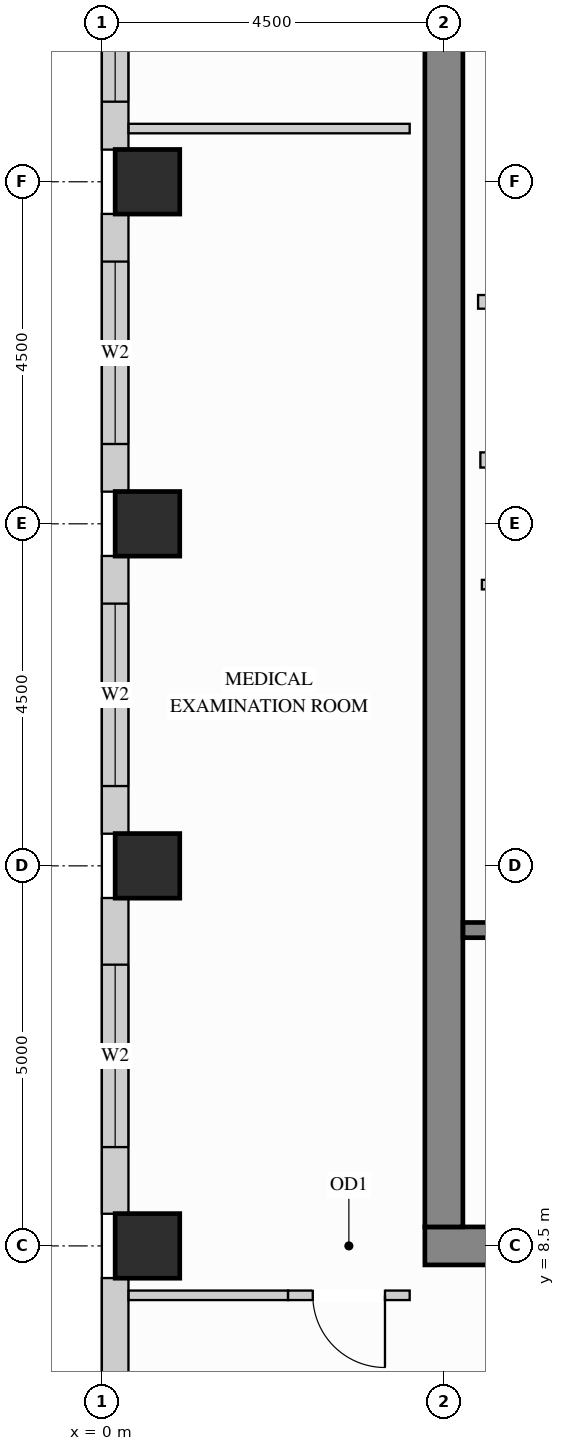
"""IFC4 building model, lengths in metres.
Left out: names, types, materials, properties, quantities, classifications, styles, units other than length and angle.
Written with IfcOpenShell. Run it as: python <this file> out.ifc"""

import sys

from ifc_helpers import new_model, si_unit, direction, frame, frame_2d, origin, origin_2d, place, context, subcontext, project, spatial, rectangle, extrude, source, transform, mapped, element, fill, save


model = new_model("IFC4")
c1 = context("Model", 3, precision=1e-05, world=origin(), true_north=direction((0.0, 1.0)))
c2 = subcontext(c1, "Body", "Model", "MODEL_VIEW")
j1 = project(units=[si_unit("LENGTHUNIT", "METRE"), si_unit("PLANEANGLEUNIT", "RADIAN")], contexts=[c1])
p1 = place(None, origin())
s1 = spatial("IfcSite", under=j1, at=p1, CompositionType="ELEMENT")
p2 = place(p1, origin())
s2 = spatial("IfcBuilding", under=s1, at=p2, CompositionType="ELEMENT")
p3 = place(p2, frame((0.0, 0.0, 226.8)))
s3 = spatial("IfcBuildingStorey", under=s2, at=p3, CompositionType="ELEMENT", Elevation=226.8)
m1 = source(origin(), c2, "Body", "SweptSolid", [
    extrude(rectangle(XDim=0.85, YDim=0.85, at=origin_2d()), origin(), (0.0, 0.0, 1.0), 3.4),
])
for number, where, z_axis, x_axis in (
    (1, (0.6, 13.5, 0.0), (0.0, 0.0, 1.0), (1.0, 0.0, 0.0)),
    (2, (0.6, 18.0, 0.0), (0.0, 0.0, 1.0), (1.0, 0.0, 0.0)),
    (3, (0.6, 22.5, 0.0), (0.0, 0.0, 1.0), (1.0, 0.0, 0.0)),
    (4, (0.6, 8.5, 0.0), (0.0, 0.0, 1.0), (1.0, 0.0, 0.0)),
):
    element("IfcColumn", number, at=place(p3, frame(where, z_axis=z_axis, x_axis=x_axis)), inside=s3, PredefinedType="COLUMN", context=c2, shape_type="MappedRepresentation", body=[
        mapped(m1, transform((0.0, 0.0, 0.0), x_axis=(1.0, 0.0, 0.0), y_axis=(0.0, 1.0, 0.0), z_axis=(0.0, 0.0, 1.0))),
    ])
m2 = source(origin(), c2, "Body", "SweptSolid", [
    extrude(rectangle(XDim=10.5, YDim=0.5, at=frame_2d((5.25, 0.0))), origin(), (0.0, 0.0, 1.0), 3.4),
])
p4 = place(p3, frame((4.25, 8.5, 0.0), z_axis=(0.0, 0.0, 1.0), x_axis=(1.0, 0.0, 0.0)))
e5 = element("IfcWall", 5, at=p4, inside=s3, PredefinedType="SHEAR", context=c2, shape_type="MappedRepresentation", body=[
    mapped(m2, transform((0.0, 0.0, 0.0), x_axis=(1.0, 0.0, 0.0), y_axis=(0.0, 1.0, 0.0), z_axis=(0.0, 0.0, 1.0))),
])
m3 = source(origin(), c2, "Body", "SweptSolid", [
    extrude(rectangle(XDim=20.5, YDim=0.5, at=frame_2d((10.25, 0.0))), origin(), (0.0, 0.0, 1.0), 3.4),
])
p5 = place(p3, frame((4.5, 8.75, 0.0), z_axis=(0.0, 0.0, 1.0), x_axis=(0.0, 1.0, 0.0)))
e6 = element("IfcWall", 6, at=p5, inside=s3, PredefinedType="SHEAR", context=c2, shape_type="MappedRepresentation", body=[
    mapped(m3, transform((0.0, 0.0, 0.0), x_axis=(1.0, 0.0, 0.0), y_axis=(0.0, 1.0, 0.0), z_axis=(0.0, 0.0, 1.0))),
])
p6 = place(p3, frame((0.175, 26.377, 0.0), z_axis=(0.0, 0.0, 1.0), x_axis=(0.0, -1.0, 0.0)))
e7 = element("IfcWall", 7, at=p6, inside=s3, PredefinedType="SOLIDWALL", context=c2, shape_type="SweptSolid", body=[
    extrude(rectangle(XDim=3.454, YDim=0.35, at=frame_2d((1.727, 0.0))), origin(), (0.0, 0.0, 1.0), 3.385),
])
p7 = place(p6, frame((0.424, 0.0, 0.78)))
e8 = element("IfcOpeningElement", 8, at=p7, cuts=e7, PredefinedType="OPENING", context=c2, shape_type="SweptSolid", body=[
    extrude(rectangle(XDim=2.4, YDim=2.1, at=frame_2d((1.2, 1.05))), frame((0.0, 0.185, 0.0), z_axis=(0.0, -1.0, 0.0), x_axis=(1.0, 0.0, 0.0)), (0.0, 0.0, 1.0), 0.37),
])
p8 = place(p3, frame((0.175, 22.077, 0.0), z_axis=(0.0, 0.0, 1.0), x_axis=(0.0, -1.0, 0.0)))
e9 = element("IfcWall", 9, at=p8, inside=s3, PredefinedType="SOLIDWALL", context=c2, shape_type="SweptSolid", body=[
    extrude(rectangle(XDim=3.654, YDim=0.35, at=frame_2d((1.827, 0.0))), origin(), (0.0, 0.0, 1.0), 3.385),
])
p9 = place(p8, frame((0.627, 0.0, 0.78)))
e10 = element("IfcOpeningElement", 10, at=p9, cuts=e9, PredefinedType="OPENING", context=c2, shape_type="SweptSolid", body=[
    extrude(rectangle(XDim=2.4, YDim=2.1, at=frame_2d((1.2, 1.05))), frame((0.0, 0.185, 0.0), z_axis=(0.0, -1.0, 0.0), x_axis=(1.0, 0.0, 0.0)), (0.0, 0.0, 1.0), 0.37),
])
p10 = place(p3, frame((0.175, 17.577, 0.0), z_axis=(0.0, 0.0, 1.0), x_axis=(0.0, -1.0, 0.0)))
e11 = element("IfcWall", 11, at=p10, inside=s3, PredefinedType="SOLIDWALL", context=c2, shape_type="SweptSolid", body=[
    extrude(rectangle(XDim=3.654, YDim=0.35, at=frame_2d((1.827, 0.0))), origin(), (0.0, 0.0, 1.0), 3.385),
])
p11 = place(p10, frame((0.627, 0.0, 0.78)))
e12 = element("IfcOpeningElement", 12, at=p11, cuts=e11, PredefinedType="OPENING", context=c2, shape_type="SweptSolid", body=[
    extrude(rectangle(XDim=2.4, YDim=2.1, at=frame_2d((1.2, 1.05))), frame((0.0, 0.185, 0.0), z_axis=(0.0, -1.0, 0.0), x_axis=(1.0, 0.0, 0.0)), (0.0, 0.0, 1.0), 0.37),
])
p12 = place(p3, frame((0.175, 13.077, 0.0), z_axis=(0.0, 0.0, 1.0), x_axis=(0.0, -1.0, 0.0)))
e13 = element("IfcWall", 13, at=p12, inside=s3, PredefinedType="SOLIDWALL", context=c2, shape_type="SweptSolid", body=[
    extrude(rectangle(XDim=4.154, YDim=0.35, at=frame_2d((2.077, 0.0))), origin(), (0.0, 0.0, 1.0), 3.385),
])
p13 = place(p12, frame((0.877, 0.0, 0.78)))
e14 = element("IfcOpeningElement", 14, at=p13, cuts=e13, PredefinedType="OPENING", context=c2, shape_type="SweptSolid", body=[
    extrude(rectangle(XDim=2.4, YDim=2.1, at=frame_2d((1.2, 1.05))), frame((0.0, 0.185, 0.0), z_axis=(0.0, -1.0, 0.0), x_axis=(1.0, 0.0, 0.0)), (0.0, 0.0, 1.0), 0.37),
])
p14 = place(p3, frame((0.175, 8.077, 0.0), z_axis=(0.0, 0.0, 1.0), x_axis=(0.0, -1.0, 0.0)))
e15 = element("IfcWall", 15, at=p14, inside=s3, PredefinedType="SOLIDWALL", context=c2, shape_type="SweptSolid", body=[
    extrude(rectangle(XDim=4.154, YDim=0.35, at=frame_2d((2.077, 0.0))), origin(), (0.0, 0.0, 1.0), 3.385),
])
p15 = place(p14, frame((2.355, 0.0, 0.78)))
e16 = element("IfcOpeningElement", 16, at=p15, cuts=e15, PredefinedType="OPENING", context=c2, shape_type="SweptSolid", body=[
    extrude(rectangle(XDim=1.2, YDim=2.1, at=frame_2d((0.6, 1.05))), frame((0.0, 0.185, 0.0), z_axis=(0.0, -1.0, 0.0), x_axis=(1.0, 0.0, 0.0)), (0.0, 0.0, 1.0), 0.37),
])
m4 = source(origin(), c2, "Body", "SweptSolid", [
    extrude(rectangle(XDim=2.2, YDim=0.18, at=frame_2d((1.1, 0.0))), origin(), (0.0, 0.0, 1.0), 3.385),
])
p16 = place(p3, frame((4.95, 20.92, 0.0), z_axis=(0.0, 0.0, 1.0), x_axis=(1.0, 0.0, 0.0)))
e17 = element("IfcWall", 17, at=p16, inside=s3, PredefinedType="PARTITIONING", context=c2, shape_type="MappedRepresentation", body=[
    mapped(m4, transform((0.0, 0.0, 0.0), x_axis=(1.0, 0.0, 0.0), y_axis=(0.0, 1.0, 0.0), z_axis=(0.0, 0.0, 1.0))),
])
p17 = place(p3, frame((5.0, 17.2, 0.0), z_axis=(0.0, 0.0, 1.0), x_axis=(1.0, 0.0, 0.0)))
e18 = element("IfcWall", 18, at=p17, inside=s3, PredefinedType="PARTITIONING", context=c2, shape_type="SweptSolid", body=[
    extrude(rectangle(XDim=2.4, YDim=0.125, at=frame_2d((1.2, 0.0))), origin(), (0.0, 0.0, 1.0), 3.385),
])
p18 = place(p17, frame((0.7, 0.0, 0.0)))
e19 = element("IfcOpeningElement", 19, at=p18, cuts=e18, PredefinedType="OPENING", context=c2, shape_type="SweptSolid", body=[
    extrude(rectangle(XDim=0.85, YDim=2.1, at=frame_2d((0.425, 1.05))), frame((0.0, 0.073, 0.0), z_axis=(0.0, -1.0, 0.0), x_axis=(1.0, 0.0, 0.0)), (0.0, 0.0, 1.0), 0.145),
])
m5 = source(origin(), c2, "Body", "SweptSolid", [
    extrude(rectangle(XDim=2.098, YDim=0.125, at=frame_2d((1.049, 0.0))), origin(), (0.0, 0.0, 1.0), 3.385),
])
p19 = place(p3, frame((0.352, 7.85, 0.0), z_axis=(0.0, 0.0, 1.0), x_axis=(1.0, 0.0, 0.0)))
e20 = element("IfcWall", 20, at=p19, inside=s3, PredefinedType="PARTITIONING", context=c2, shape_type="MappedRepresentation", body=[
    mapped(m5, transform((0.0, 0.0, 0.0), x_axis=(1.0, 0.0, 0.0), y_axis=(0.0, 1.0, 0.0), z_axis=(0.0, 0.0, 1.0))),
])
p20 = place(p3, frame((2.45, 7.85, 0.0), z_axis=(0.0, 0.0, 1.0), x_axis=(1.0, 0.0, 0.0)))
e21 = element("IfcWall", 21, at=p20, inside=s3, PredefinedType="PARTITIONING", context=c2, shape_type="SweptSolid", body=[
    extrude(rectangle(XDim=1.6, YDim=0.125, at=frame_2d((0.8, 0.0))), origin(), (0.0, 0.0, 1.0), 3.385),
])
p21 = place(p20, frame((0.325, 0.0, 0.0)))
e22 = element("IfcOpeningElement", 22, at=p21, cuts=e21, PredefinedType="OPENING", context=c2, shape_type="SweptSolid", body=[
    extrude(rectangle(XDim=0.95, YDim=2.15, at=frame_2d((0.475, 1.075))), frame((0.0, 0.073, 0.0), z_axis=(0.0, -1.0, 0.0), x_axis=(1.0, 0.0, 0.0)), (0.0, 0.0, 1.0), 0.145),
])
m6 = source(origin(), c2, "Body", "SweptSolid", [
    extrude(rectangle(XDim=3.698, YDim=0.125, at=frame_2d((1.849, 0.0))), origin(), (0.0, 0.0, 1.0), 3.385),
])
p22 = place(p3, frame((0.352, 23.2, 0.0), z_axis=(0.0, 0.0, 1.0), x_axis=(1.0, 0.0, 0.0)))
e23 = element("IfcWall", 23, at=p22, inside=s3, PredefinedType="PARTITIONING", context=c2, shape_type="MappedRepresentation", body=[
    mapped(m6, transform((0.0, 0.0, 0.0), x_axis=(1.0, 0.0, 0.0), y_axis=(0.0, 1.0, 0.0), z_axis=(0.0, 0.0, 1.0))),
])
m7 = source(origin(), c2, "Body", "SweptSolid", [
    extrude(rectangle(XDim=2.09, YDim=0.2, at=frame_2d((1.045, 0.0))), origin(), (0.0, 0.0, 1.0), 3.385),
])
p23 = place(p3, frame((4.98, 18.84, 0.0), z_axis=(0.0, 0.0, 1.0), x_axis=(1.0, 0.0, 0.0)))
e24 = element("IfcWall", 24, at=p23, inside=s3, PredefinedType="PARTITIONING", context=c2, shape_type="MappedRepresentation", body=[
    mapped(m7, transform((0.0, 0.0, 0.0), x_axis=(1.0, 0.0, 0.0), y_axis=(0.0, 1.0, 0.0), z_axis=(0.0, 0.0, 1.0))),
])
p24 = place(p3, frame((4.752, 12.655, 0.0), z_axis=(0.0, 0.0, 1.0), x_axis=(1.0, 0.0, 0.0)))
e25 = element("IfcWall", 25, at=p24, inside=s3, PredefinedType="SHEAR", context=c2, shape_type="SweptSolid", body=[
    extrude(rectangle(XDim=7.653, YDim=0.2, at=frame_2d((3.827, 0.0))), origin(), (0.0, 0.0, 1.0), 3.4),
])
p25 = place(p24, frame((0.4, 0.0, 0.0)))
e26 = element("IfcOpeningElement", 26, at=p25, cuts=e25, PredefinedType="OPENING", context=c2, shape_type="SweptSolid", body=[
    extrude(rectangle(XDim=1.1, YDim=2.15, at=frame_2d((0.55, 1.075))), frame((0.0, 0.11, 0.0), z_axis=(0.0, -1.0, 0.0), x_axis=(1.0, 0.0, 0.0)), (0.0, 0.0, 1.0), 0.22),
])
m8 = source(origin(), c2, "Body", "SweptSolid", [
    extrude(rectangle(XDim=0.95, YDim=2.15, at=frame_2d((0.475, 1.075))), frame((0.0, 0.025, 0.0), z_axis=(0.0, -1.0, 0.0), x_axis=(1.0, 0.0, 0.0)), (0.0, 0.0, 1.0), 0.05),
])
p26 = place(p21, origin())
e27 = element("IfcDoor", 27, at=p26, inside=s3, OperationType="SINGLE_SWING_RIGHT", PredefinedType="DOOR", context=c2, shape_type="MappedRepresentation", body=[
    mapped(m8, transform((0.0, 0.0, 0.0), x_axis=(1.0, 0.0, 0.0), y_axis=(0.0, 1.0, 0.0), z_axis=(0.0, 0.0, 1.0))),
])
fill(e22, e27)
m9 = source(origin(), c2, "Body", "SweptSolid", [
    extrude(rectangle(XDim=2.4, YDim=2.1, at=frame_2d((1.2, 1.05))), frame((0.0, 0.03, 0.0), z_axis=(0.0, -1.0, 0.0), x_axis=(1.0, 0.0, 0.0)), (0.0, 0.0, 1.0), 0.06),
])
p27 = place(p7, origin())
e28 = element("IfcWindow", 28, at=p27, inside=s3, PartitioningType="SINGLE_PANEL", PredefinedType="WINDOW", context=c2, shape_type="MappedRepresentation", body=[
    mapped(m9, transform((0.0, 0.0, 0.0), x_axis=(1.0, 0.0, 0.0), y_axis=(0.0, 1.0, 0.0), z_axis=(0.0, 0.0, 1.0))),
])
fill(e8, e28)
p28 = place(p9, origin())
e29 = element("IfcWindow", 29, at=p28, inside=s3, PartitioningType="SINGLE_PANEL", PredefinedType="WINDOW", context=c2, shape_type="MappedRepresentation", body=[
    mapped(m9, transform((0.0, 0.0, 0.0), x_axis=(1.0, 0.0, 0.0), y_axis=(0.0, 1.0, 0.0), z_axis=(0.0, 0.0, 1.0))),
])
fill(e10, e29)
p29 = place(p11, origin())
e30 = element("IfcWindow", 30, at=p29, inside=s3, PartitioningType="SINGLE_PANEL", PredefinedType="WINDOW", context=c2, shape_type="MappedRepresentation", body=[
    mapped(m9, transform((0.0, 0.0, 0.0), x_axis=(1.0, 0.0, 0.0), y_axis=(0.0, 1.0, 0.0), z_axis=(0.0, 0.0, 1.0))),
])
fill(e12, e30)
p30 = place(p13, origin())
e31 = element("IfcWindow", 31, at=p30, inside=s3, PartitioningType="SINGLE_PANEL", PredefinedType="WINDOW", context=c2, shape_type="MappedRepresentation", body=[
    mapped(m9, transform((0.0, 0.0, 0.0), x_axis=(1.0, 0.0, 0.0), y_axis=(0.0, 1.0, 0.0), z_axis=(0.0, 0.0, 1.0))),
])
fill(e14, e31)
save(model, sys.argv[1])
